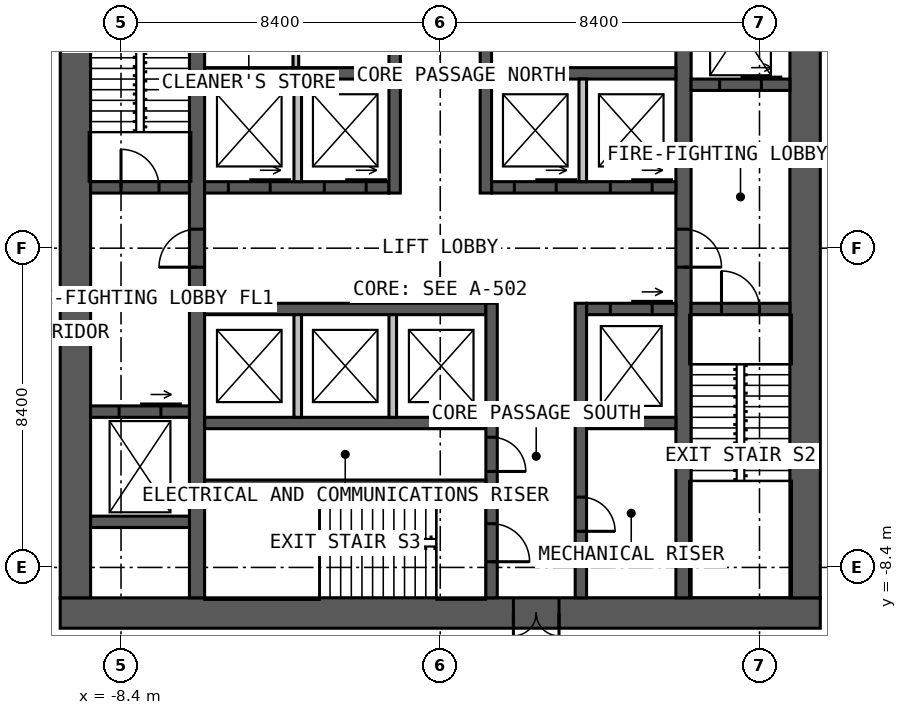
"""IFC4 building model, lengths in metres.
Left out: names, types, materials, properties, quantities, classifications, styles, units other than length and angle.
Written with IfcOpenShell. Run it as: python <this file> out.ifc"""

import sys

from ifc_helpers import new_model, si_unit, direction, frame, frame_2d, origin, place, context, subcontext, project, spatial, rectangle, extrude, element, fill, save


model = new_model("IFC4")
c1 = context("Model", 3, precision=1e-05, world=origin(), true_north=direction((0.0, 1.0)))
c2 = subcontext(c1, "Body", "Model", "MODEL_VIEW")
j1 = project(units=[si_unit("LENGTHUNIT", "METRE"), si_unit("PLANEANGLEUNIT", "RADIAN")], contexts=[c1])
p1 = place(None, origin())
s1 = spatial("IfcSite", under=j1, at=p1, CompositionType="ELEMENT")
p2 = place(p1, origin())
s2 = spatial("IfcBuilding", under=s1, at=p2, CompositionType="ELEMENT")
p3 = place(p2, frame((0.0, 0.0, 61.0)))
s3 = spatial("IfcBuildingStorey", under=s2, at=p3, CompositionType="ELEMENT", Elevation=61.0)
p4 = place(p3, frame((10.0, -9.6, 0.0), z_axis=(0.0, 0.0, 1.0), x_axis=(-1.0, 0.0, 0.0)))
e1 = element("IfcWall", 1, at=p4, inside=s3, PredefinedType="SOLIDWALL", context=c2, shape_type="SweptSolid", body=[
    extrude(rectangle(XDim=20.0, YDim=0.8, at=frame_2d((10.0, 0.0))), origin(), (0.0, 0.0, 1.0), 4.0),
])
p5 = place(p4, frame((6.875, 0.0, 0.0)))
e2 = element("IfcOpeningElement", 2, at=p5, cuts=e1, PredefinedType="OPENING", context=c2, shape_type="SweptSolid", body=[
    extrude(rectangle(XDim=1.2, YDim=2.2, at=frame_2d((0.6, 1.1))), frame((0.0, 0.41, 0.0), z_axis=(0.0, -1.0, 0.0), x_axis=(1.0, 0.0, 0.0)), (0.0, 0.0, 1.0), 0.82),
])
for number, where, z_axis, x_axis in (
    (3, (9.6, -9.2, 0.0), (0.0, 0.0, 1.0), (0.0, 1.0, 0.0)),
    (4, (-9.6, 9.2, 0.0), (0.0, 0.0, 1.0), (0.0, -1.0, 0.0)),
):
    element("IfcWall", number, at=place(p3, frame(where, z_axis=z_axis, x_axis=x_axis)), inside=s3, PredefinedType="SOLIDWALL", context=c2, shape_type="SweptSolid", body=[
        extrude(rectangle(XDim=18.4, YDim=0.8, at=frame_2d((9.2, 0.0))), origin(), (0.0, 0.0, 1.0), 4.0),
    ])
p6 = place(p3, frame((-6.4, -9.2, 0.0), z_axis=(0.0, 0.0, 1.0), x_axis=(0.0, 1.0, 0.0)))
e5 = element("IfcWall", 5, at=p6, inside=s3, PredefinedType="SOLIDWALL", context=c2, shape_type="SweptSolid", body=[
    extrude(rectangle(XDim=18.4, YDim=0.4, at=frame_2d((9.2, 0.0))), origin(), (0.0, 0.0, 1.0), 4.0),
])
p7 = place(p6, frame((8.7, 0.0, 0.0)))
e6 = element("IfcOpeningElement", 6, at=p7, cuts=e5, PredefinedType="OPENING", context=c2, shape_type="SweptSolid", body=[
    extrude(rectangle(XDim=1.0, YDim=2.2, at=frame_2d((0.5, 1.1))), frame((0.0, 0.21, 0.0), z_axis=(0.0, -1.0, 0.0), x_axis=(1.0, 0.0, 0.0)), (0.0, 0.0, 1.0), 0.42),
])
p8 = place(p3, frame((6.4, 9.2, 0.0), z_axis=(0.0, 0.0, 1.0), x_axis=(0.0, -1.0, 0.0)))
e7 = element("IfcWall", 7, at=p8, inside=s3, PredefinedType="SOLIDWALL", context=c2, shape_type="SweptSolid", body=[
    extrude(rectangle(XDim=18.4, YDim=0.4, at=frame_2d((9.2, 0.0))), origin(), (0.0, 0.0, 1.0), 4.0),
])
p9 = place(p8, frame((8.7, 0.0, 0.0)))
e8 = element("IfcOpeningElement", 8, at=p9, cuts=e7, PredefinedType="OPENING", context=c2, shape_type="SweptSolid", body=[
    extrude(rectangle(XDim=1.0, YDim=2.2, at=frame_2d((0.5, 1.1))), frame((0.0, 0.21, 0.0), z_axis=(0.0, -1.0, 0.0), x_axis=(1.0, 0.0, 0.0)), (0.0, 0.0, 1.0), 0.42),
])
p10 = place(p3, frame((-6.2, 1.6, 0.0), z_axis=(0.0, 0.0, 1.0), x_axis=(1.0, 0.0, 0.0)))
e9 = element("IfcWall", 9, at=p10, inside=s3, PredefinedType="SOLIDWALL", context=c2, shape_type="SweptSolid", body=[
    extrude(rectangle(XDim=4.85, YDim=0.3, at=frame_2d((2.425, 0.0))), origin(), (0.0, 0.0, 1.0), 4.0),
])
p11 = place(p10, frame((0.625, 0.0, 0.0)))
e10 = element("IfcOpeningElement", 10, at=p11, cuts=e9, PredefinedType="OPENING", context=c2, shape_type="SweptSolid", body=[
    extrude(rectangle(XDim=1.1, YDim=2.2, at=frame_2d((0.55, 1.1))), frame((0.0, 0.16, 0.0), z_axis=(0.0, -1.0, 0.0), x_axis=(1.0, 0.0, 0.0)), (0.0, 0.0, 1.0), 0.32),
])
p12 = place(p10, frame((3.15, 0.0, 0.0)))
e11 = element("IfcOpeningElement", 11, at=p12, cuts=e9, PredefinedType="OPENING", context=c2, shape_type="SweptSolid", body=[
    extrude(rectangle(XDim=1.1, YDim=2.2, at=frame_2d((0.55, 1.1))), frame((0.0, 0.16, 0.0), z_axis=(0.0, -1.0, 0.0), x_axis=(1.0, 0.0, 0.0)), (0.0, 0.0, 1.0), 0.32),
])
p13 = place(p3, frame((1.35, 1.6, 0.0), z_axis=(0.0, 0.0, 1.0), x_axis=(1.0, 0.0, 0.0)))
e12 = element("IfcWall", 12, at=p13, inside=s3, PredefinedType="SOLIDWALL", context=c2, shape_type="SweptSolid", body=[
    extrude(rectangle(XDim=4.85, YDim=0.3, at=frame_2d((2.425, 0.0))), origin(), (0.0, 0.0, 1.0), 4.0),
])
p14 = place(p13, frame((0.6, 0.0, 0.0)))
e13 = element("IfcOpeningElement", 13, at=p14, cuts=e12, PredefinedType="OPENING", context=c2, shape_type="SweptSolid", body=[
    extrude(rectangle(XDim=1.1, YDim=2.2, at=frame_2d((0.55, 1.1))), frame((0.0, 0.16, 0.0), z_axis=(0.0, -1.0, 0.0), x_axis=(1.0, 0.0, 0.0)), (0.0, 0.0, 1.0), 0.32),
])
p15 = place(p13, frame((3.125, 0.0, 0.0)))
e14 = element("IfcOpeningElement", 14, at=p15, cuts=e12, PredefinedType="OPENING", context=c2, shape_type="SweptSolid", body=[
    extrude(rectangle(XDim=1.1, YDim=2.2, at=frame_2d((0.55, 1.1))), frame((0.0, 0.16, 0.0), z_axis=(0.0, -1.0, 0.0), x_axis=(1.0, 0.0, 0.0)), (0.0, 0.0, 1.0), 0.32),
])
for number, where, z_axis, x_axis in (
    (15, (-6.2, 4.6, 0.0), (0.0, 0.0, 1.0), (1.0, 0.0, 0.0)),
    (16, (1.35, 4.6, 0.0), (0.0, 0.0, 1.0), (1.0, 0.0, 0.0)),
):
    element("IfcWall", number, at=place(p3, frame(where, z_axis=z_axis, x_axis=x_axis)), inside=s3, PredefinedType="SOLIDWALL", context=c2, shape_type="SweptSolid", body=[
        extrude(rectangle(XDim=4.85, YDim=0.3, at=frame_2d((2.425, 0.0))), origin(), (0.0, 0.0, 1.0), 4.0),
    ])
p16 = place(p3, frame((-1.2, 1.45, 0.0), z_axis=(0.0, 0.0, 1.0), x_axis=(0.0, 1.0, 0.0)))
e17 = element("IfcWall", 17, at=p16, inside=s3, PredefinedType="SOLIDWALL", context=c2, shape_type="SweptSolid", body=[
    extrude(rectangle(XDim=7.75, YDim=0.3, at=frame_2d((3.875, 0.0))), origin(), (0.0, 0.0, 1.0), 4.0),
])
p17 = place(p16, frame((5.05, 0.0, 0.0)))
e18 = element("IfcOpeningElement", 18, at=p17, cuts=e17, PredefinedType="OPENING", context=c2, shape_type="SweptSolid", body=[
    extrude(rectangle(XDim=1.0, YDim=2.2, at=frame_2d((0.5, 1.1))), frame((0.0, 0.16, 0.0), z_axis=(0.0, -1.0, 0.0), x_axis=(1.0, 0.0, 0.0)), (0.0, 0.0, 1.0), 0.32),
])
p18 = place(p3, frame((1.2, 1.45, 0.0), z_axis=(0.0, 0.0, 1.0), x_axis=(0.0, 1.0, 0.0)))
e19 = element("IfcWall", 19, at=p18, inside=s3, PredefinedType="SOLIDWALL", context=c2, shape_type="SweptSolid", body=[
    extrude(rectangle(XDim=7.75, YDim=0.3, at=frame_2d((3.875, 0.0))), origin(), (0.0, 0.0, 1.0), 4.0),
])
p19 = place(p18, frame((3.8, 0.0, 0.0)))
e20 = element("IfcOpeningElement", 20, at=p19, cuts=e19, PredefinedType="OPENING", context=c2, shape_type="SweptSolid", body=[
    extrude(rectangle(XDim=1.0, YDim=2.2, at=frame_2d((0.5, 1.1))), frame((0.0, 0.16, 0.0), z_axis=(0.0, -1.0, 0.0), x_axis=(1.0, 0.0, 0.0)), (0.0, 0.0, 1.0), 0.32),
])
p20 = place(p18, frame((6.15, 0.0, 0.0)))
e21 = element("IfcOpeningElement", 21, at=p20, cuts=e19, PredefinedType="OPENING", context=c2, shape_type="SweptSolid", body=[
    extrude(rectangle(XDim=1.0, YDim=2.2, at=frame_2d((0.5, 1.1))), frame((0.0, 0.16, 0.0), z_axis=(0.0, -1.0, 0.0), x_axis=(1.0, 0.0, 0.0)), (0.0, 0.0, 1.0), 0.32),
])
p21 = place(p3, frame((-6.2, -1.6, 0.0), z_axis=(0.0, 0.0, 1.0), x_axis=(1.0, 0.0, 0.0)))
e22 = element("IfcWall", 22, at=p21, inside=s3, PredefinedType="SOLIDWALL", context=c2, shape_type="SweptSolid", body=[
    extrude(rectangle(XDim=7.4, YDim=0.3, at=frame_2d((3.7, 0.0))), origin(), (0.0, 0.0, 1.0), 4.0),
])
p22 = place(p3, frame((3.85, -1.6, 0.0), z_axis=(0.0, 0.0, 1.0), x_axis=(1.0, 0.0, 0.0)))
e23 = element("IfcWall", 23, at=p22, inside=s3, PredefinedType="SOLIDWALL", context=c2, shape_type="SweptSolid", body=[
    extrude(rectangle(XDim=2.35, YDim=0.3, at=frame_2d((1.175, 0.0))), origin(), (0.0, 0.0, 1.0), 4.0),
])
p23 = place(p22, frame((0.625, 0.0, 0.0)))
e24 = element("IfcOpeningElement", 24, at=p23, cuts=e23, PredefinedType="OPENING", context=c2, shape_type="SweptSolid", body=[
    extrude(rectangle(XDim=1.1, YDim=2.2, at=frame_2d((0.55, 1.1))), frame((0.0, 0.16, 0.0), z_axis=(0.0, -1.0, 0.0), x_axis=(1.0, 0.0, 0.0)), (0.0, 0.0, 1.0), 0.32),
])
p24 = place(p3, frame((-6.2, -4.6, 0.0), z_axis=(0.0, 0.0, 1.0), x_axis=(1.0, 0.0, 0.0)))
e25 = element("IfcWall", 25, at=p24, inside=s3, PredefinedType="SOLIDWALL", context=c2, shape_type="SweptSolid", body=[
    extrude(rectangle(XDim=7.4, YDim=0.3, at=frame_2d((3.7, 0.0))), origin(), (0.0, 0.0, 1.0), 4.0),
])
p25 = place(p3, frame((3.85, -4.6, 0.0), z_axis=(0.0, 0.0, 1.0), x_axis=(1.0, 0.0, 0.0)))
e26 = element("IfcWall", 26, at=p25, inside=s3, PredefinedType="SOLIDWALL", context=c2, shape_type="SweptSolid", body=[
    extrude(rectangle(XDim=2.35, YDim=0.3, at=frame_2d((1.175, 0.0))), origin(), (0.0, 0.0, 1.0), 4.0),
])
p26 = place(p3, frame((1.35, -1.45, 0.0), z_axis=(0.0, 0.0, 1.0), x_axis=(0.0, -1.0, 0.0)))
e27 = element("IfcWall", 27, at=p26, inside=s3, PredefinedType="SOLIDWALL", context=c2, shape_type="SweptSolid", body=[
    extrude(rectangle(XDim=7.75, YDim=0.3, at=frame_2d((3.875, 0.0))), origin(), (0.0, 0.0, 1.0), 4.0),
])
p27 = place(p26, frame((5.8, 0.0, 0.0)))
e28 = element("IfcOpeningElement", 28, at=p27, cuts=e27, PredefinedType="OPENING", context=c2, shape_type="SweptSolid", body=[
    extrude(rectangle(XDim=1.0, YDim=2.2, at=frame_2d((0.5, 1.1))), frame((0.0, 0.16, 0.0), z_axis=(0.0, -1.0, 0.0), x_axis=(1.0, 0.0, 0.0)), (0.0, 0.0, 1.0), 0.32),
])
p28 = place(p26, frame((3.525, 0.0, 0.0)))
e29 = element("IfcOpeningElement", 29, at=p28, cuts=e27, PredefinedType="OPENING", context=c2, shape_type="SweptSolid", body=[
    extrude(rectangle(XDim=0.9, YDim=2.2, at=frame_2d((0.45, 1.1))), frame((0.0, 0.16, 0.0), z_axis=(0.0, -1.0, 0.0), x_axis=(1.0, 0.0, 0.0)), (0.0, 0.0, 1.0), 0.32),
])
p29 = place(p3, frame((3.7, -1.45, 0.0), z_axis=(0.0, 0.0, 1.0), x_axis=(0.0, -1.0, 0.0)))
e30 = element("IfcWall", 30, at=p29, inside=s3, PredefinedType="SOLIDWALL", context=c2, shape_type="SweptSolid", body=[
    extrude(rectangle(XDim=7.75, YDim=0.3, at=frame_2d((3.875, 0.0))), origin(), (0.0, 0.0, 1.0), 4.0),
])
p30 = place(p29, frame((5.1, 0.0, 0.0)))
e31 = element("IfcOpeningElement", 31, at=p30, cuts=e30, PredefinedType="OPENING", context=c2, shape_type="SweptSolid", body=[
    extrude(rectangle(XDim=0.9, YDim=2.2, at=frame_2d((0.45, 1.1))), frame((0.0, 0.16, 0.0), z_axis=(0.0, -1.0, 0.0), x_axis=(1.0, 0.0, 0.0)), (0.0, 0.0, 1.0), 0.32),
])
p31 = place(p3, frame((-6.2, -6.2, 0.0), z_axis=(0.0, 0.0, 1.0), x_axis=(1.0, 0.0, 0.0)))
e32 = element("IfcWall", 32, at=p31, inside=s3, PredefinedType="SOLIDWALL", context=c2, shape_type="SweptSolid", body=[
    extrude(rectangle(XDim=7.4, YDim=0.2, at=frame_2d((3.7, 0.0))), origin(), (0.0, 0.0, 1.0), 4.0),
])
p32 = place(p3, frame((-9.2, 1.6, 0.0), z_axis=(0.0, 0.0, 1.0), x_axis=(1.0, 0.0, 0.0)))
e33 = element("IfcWall", 33, at=p32, inside=s3, PredefinedType="SOLIDWALL", context=c2, shape_type="SweptSolid", body=[
    extrude(rectangle(XDim=2.6, YDim=0.3, at=frame_2d((1.3, 0.0))), origin(), (0.0, 0.0, 1.0), 4.0),
])
p33 = place(p32, frame((0.8, 0.0, 0.0)))
e34 = element("IfcOpeningElement", 34, at=p33, cuts=e33, PredefinedType="OPENING", context=c2, shape_type="SweptSolid", body=[
    extrude(rectangle(XDim=1.0, YDim=2.2, at=frame_2d((0.5, 1.1))), frame((0.0, 0.16, 0.0), z_axis=(0.0, -1.0, 0.0), x_axis=(1.0, 0.0, 0.0)), (0.0, 0.0, 1.0), 0.32),
])
p34 = place(p3, frame((6.6, -1.6, 0.0), z_axis=(0.0, 0.0, 1.0), x_axis=(1.0, 0.0, 0.0)))
e35 = element("IfcWall", 35, at=p34, inside=s3, PredefinedType="SOLIDWALL", context=c2, shape_type="SweptSolid", body=[
    extrude(rectangle(XDim=2.6, YDim=0.3, at=frame_2d((1.3, 0.0))), origin(), (0.0, 0.0, 1.0), 4.0),
])
p35 = place(p34, frame((0.8, 0.0, 0.0)))
e36 = element("IfcOpeningElement", 36, at=p35, cuts=e35, PredefinedType="OPENING", context=c2, shape_type="SweptSolid", body=[
    extrude(rectangle(XDim=1.0, YDim=2.2, at=frame_2d((0.5, 1.1))), frame((0.0, 0.16, 0.0), z_axis=(0.0, -1.0, 0.0), x_axis=(1.0, 0.0, 0.0)), (0.0, 0.0, 1.0), 0.32),
])
p36 = place(p3, frame((-9.2, -4.3, 0.0), z_axis=(0.0, 0.0, 1.0), x_axis=(1.0, 0.0, 0.0)))
e37 = element("IfcWall", 37, at=p36, inside=s3, PredefinedType="SOLIDWALL", context=c2, shape_type="SweptSolid", body=[
    extrude(rectangle(XDim=2.6, YDim=0.3, at=frame_2d((1.3, 0.0))), origin(), (0.0, 0.0, 1.0), 4.0),
])
p37 = place(p36, frame((0.75, 0.0, 0.0)))
e38 = element("IfcOpeningElement", 38, at=p37, cuts=e37, PredefinedType="OPENING", context=c2, shape_type="SweptSolid", body=[
    extrude(rectangle(XDim=1.1, YDim=2.2, at=frame_2d((0.55, 1.1))), frame((0.0, 0.16, 0.0), z_axis=(0.0, -1.0, 0.0), x_axis=(1.0, 0.0, 0.0)), (0.0, 0.0, 1.0), 0.32),
])
p38 = place(p3, frame((6.6, 4.3, 0.0), z_axis=(0.0, 0.0, 1.0), x_axis=(1.0, 0.0, 0.0)))
e39 = element("IfcWall", 39, at=p38, inside=s3, PredefinedType="SOLIDWALL", context=c2, shape_type="SweptSolid", body=[
    extrude(rectangle(XDim=2.6, YDim=0.3, at=frame_2d((1.3, 0.0))), origin(), (0.0, 0.0, 1.0), 4.0),
])
p39 = place(p38, frame((0.75, 0.0, 0.0)))
e40 = element("IfcOpeningElement", 40, at=p39, cuts=e39, PredefinedType="OPENING", context=c2, shape_type="SweptSolid", body=[
    extrude(rectangle(XDim=1.1, YDim=2.2, at=frame_2d((0.55, 1.1))), frame((0.0, 0.16, 0.0), z_axis=(0.0, -1.0, 0.0), x_axis=(1.0, 0.0, 0.0)), (0.0, 0.0, 1.0), 0.32),
])
p40 = place(p3, frame((-9.2, -7.2, 0.0), z_axis=(0.0, 0.0, 1.0), x_axis=(1.0, 0.0, 0.0)))
e41 = element("IfcWall", 41, at=p40, inside=s3, PredefinedType="SOLIDWALL", context=c2, shape_type="SweptSolid", body=[
    extrude(rectangle(XDim=2.6, YDim=0.3, at=frame_2d((1.3, 0.0))), origin(), (0.0, 0.0, 1.0), 4.0),
])
for number, where, z_axis, x_axis in (
    (42, (-3.75, 1.75, 0.0), (0.0, 0.0, 1.0), (0.0, 1.0, 0.0)),
    (43, (3.75, 1.75, 0.0), (0.0, 0.0, 1.0), (0.0, 1.0, 0.0)),
    (44, (-3.75, -1.75, 0.0), (0.0, 0.0, 1.0), (0.0, -1.0, 0.0)),
    (45, (-1.25, -1.75, 0.0), (0.0, 0.0, 1.0), (0.0, -1.0, 0.0)),
):
    element("IfcWall", number, at=place(p3, frame(where, z_axis=z_axis, x_axis=x_axis)), inside=s3, PredefinedType="SOLIDWALL", context=c2, shape_type="SweptSolid", body=[
        extrude(rectangle(XDim=2.7, YDim=0.2, at=frame_2d((1.35, 0.0))), origin(), (0.0, 0.0, 1.0), 3.75),
    ])
p41 = place(p3, frame((-3.8, 4.75, 0.0), z_axis=(0.0, 0.0, 1.0), x_axis=(0.0, 1.0, 0.0)))
e46 = element("IfcWall", 46, at=p41, inside=s3, PredefinedType="PARTITIONING", context=c2, shape_type="SweptSolid", body=[
    extrude(rectangle(XDim=1.375, YDim=0.15, at=frame_2d((0.688, 0.0))), origin(), (0.0, 0.0, 1.0), 3.75),
])
p42 = place(p5, origin())
e47 = element("IfcDoor", 47, at=p42, inside=s3, OperationType="DOUBLE_DOOR_SINGLE_SWING", PredefinedType="DOOR", context=c2, shape_type="SweptSolid", body=[
    extrude(rectangle(XDim=1.2, YDim=2.2, at=frame_2d((0.6, 1.1))), frame((0.0, 0.025, 0.0), z_axis=(0.0, -1.0, 0.0), x_axis=(1.0, 0.0, 0.0)), (0.0, 0.0, 1.0), 0.05),
])
fill(e2, e47)
p43 = place(p7, origin())
e48 = element("IfcDoor", 48, at=p43, inside=s3, OperationType="SINGLE_SWING_LEFT", PredefinedType="DOOR", context=c2, shape_type="SweptSolid", body=[
    extrude(rectangle(XDim=1.0, YDim=2.2, at=frame_2d((0.5, 1.1))), frame((0.0, 0.025, 0.0), z_axis=(0.0, -1.0, 0.0), x_axis=(1.0, 0.0, 0.0)), (0.0, 0.0, 1.0), 0.05),
])
fill(e6, e48)
p44 = place(p9, origin())
e49 = element("IfcDoor", 49, at=p44, inside=s3, OperationType="SINGLE_SWING_RIGHT", PredefinedType="DOOR", context=c2, shape_type="SweptSolid", body=[
    extrude(rectangle(XDim=1.0, YDim=2.2, at=frame_2d((0.5, 1.1))), frame((0.0, 0.025, 0.0), z_axis=(0.0, -1.0, 0.0), x_axis=(1.0, 0.0, 0.0)), (0.0, 0.0, 1.0), 0.05),
])
fill(e8, e49)
p45 = place(p33, origin())
e50 = element("IfcDoor", 50, at=p45, inside=s3, OperationType="SINGLE_SWING_LEFT", PredefinedType="DOOR", context=c2, shape_type="SweptSolid", body=[
    extrude(rectangle(XDim=1.0, YDim=2.2, at=frame_2d((0.5, 1.1))), frame((0.0, 0.025, 0.0), z_axis=(0.0, -1.0, 0.0), x_axis=(1.0, 0.0, 0.0)), (0.0, 0.0, 1.0), 0.05),
])
fill(e34, e50)
p46 = place(p35, origin())
e51 = element("IfcDoor", 51, at=p46, inside=s3, OperationType="SINGLE_SWING_LEFT", PredefinedType="DOOR", context=c2, shape_type="SweptSolid", body=[
    extrude(rectangle(XDim=1.0, YDim=2.2, at=frame_2d((0.5, 1.1))), frame((0.0, 0.025, 0.0), z_axis=(0.0, -1.0, 0.0), x_axis=(1.0, 0.0, 0.0)), (0.0, 0.0, 1.0), 0.05),
])
fill(e36, e51)
p47 = place(p27, origin())
e52 = element("IfcDoor", 52, at=p47, inside=s3, OperationType="SINGLE_SWING_RIGHT", PredefinedType="DOOR", context=c2, shape_type="SweptSolid", body=[
    extrude(rectangle(XDim=1.0, YDim=2.2, at=frame_2d((0.5, 1.1))), frame((0.0, 0.025, 0.0), z_axis=(0.0, -1.0, 0.0), x_axis=(1.0, 0.0, 0.0)), (0.0, 0.0, 1.0), 0.05),
])
fill(e28, e52)
p48 = place(p28, origin())
e53 = element("IfcDoor", 53, at=p48, inside=s3, OperationType="SINGLE_SWING_RIGHT", PredefinedType="DOOR", context=c2, shape_type="SweptSolid", body=[
    extrude(rectangle(XDim=0.9, YDim=2.2, at=frame_2d((0.45, 1.1))), frame((0.0, 0.025, 0.0), z_axis=(0.0, -1.0, 0.0), x_axis=(1.0, 0.0, 0.0)), (0.0, 0.0, 1.0), 0.05),
])
fill(e29, e53)
p49 = place(p30, origin())
e54 = element("IfcDoor", 54, at=p49, inside=s3, OperationType="SINGLE_SWING_RIGHT", PredefinedType="DOOR", context=c2, shape_type="SweptSolid", body=[
    extrude(rectangle(XDim=0.9, YDim=2.2, at=frame_2d((0.45, 1.1))), frame((0.0, 0.025, 0.0), z_axis=(0.0, -1.0, 0.0), x_axis=(1.0, 0.0, 0.0)), (0.0, 0.0, 1.0), 0.05),
])
fill(e31, e54)
p50 = place(p11, origin())
e55 = element("IfcDoor", 55, at=p50, inside=s3, OperationType="SLIDING_TO_LEFT", PredefinedType="DOOR", context=c2, shape_type="SweptSolid", body=[
    extrude(rectangle(XDim=1.1, YDim=2.2, at=frame_2d((0.55, 1.1))), frame((0.0, 0.025, 0.0), z_axis=(0.0, -1.0, 0.0), x_axis=(1.0, 0.0, 0.0)), (0.0, 0.0, 1.0), 0.05),
])
fill(e10, e55)
p51 = place(p12, origin())
e56 = element("IfcDoor", 56, at=p51, inside=s3, OperationType="SLIDING_TO_LEFT", PredefinedType="DOOR", context=c2, shape_type="SweptSolid", body=[
    extrude(rectangle(XDim=1.1, YDim=2.2, at=frame_2d((0.55, 1.1))), frame((0.0, 0.025, 0.0), z_axis=(0.0, -1.0, 0.0), x_axis=(1.0, 0.0, 0.0)), (0.0, 0.0, 1.0), 0.05),
])
fill(e11, e56)
p52 = place(p14, origin())
e57 = element("IfcDoor", 57, at=p52, inside=s3, OperationType="SLIDING_TO_LEFT", PredefinedType="DOOR", context=c2, shape_type="SweptSolid", body=[
    extrude(rectangle(XDim=1.1, YDim=2.2, at=frame_2d((0.55, 1.1))), frame((0.0, 0.025, 0.0), z_axis=(0.0, -1.0, 0.0), x_axis=(1.0, 0.0, 0.0)), (0.0, 0.0, 1.0), 0.05),
])
fill(e13, e57)
p53 = place(p15, origin())
e58 = element("IfcDoor", 58, at=p53, inside=s3, OperationType="SLIDING_TO_LEFT", PredefinedType="DOOR", context=c2, shape_type="SweptSolid", body=[
    extrude(rectangle(XDim=1.1, YDim=2.2, at=frame_2d((0.55, 1.1))), frame((0.0, 0.025, 0.0), z_axis=(0.0, -1.0, 0.0), x_axis=(1.0, 0.0, 0.0)), (0.0, 0.0, 1.0), 0.05),
])
fill(e14, e58)
p54 = place(p23, origin())
e59 = element("IfcDoor", 59, at=p54, inside=s3, OperationType="SLIDING_TO_LEFT", PredefinedType="DOOR", context=c2, shape_type="SweptSolid", body=[
    extrude(rectangle(XDim=1.1, YDim=2.2, at=frame_2d((0.55, 1.1))), frame((0.0, 0.025, 0.0), z_axis=(0.0, -1.0, 0.0), x_axis=(1.0, 0.0, 0.0)), (0.0, 0.0, 1.0), 0.05),
])
fill(e24, e59)
p55 = place(p37, origin())
e60 = element("IfcDoor", 60, at=p55, inside=s3, OperationType="SLIDING_TO_LEFT", PredefinedType="DOOR", context=c2, shape_type="SweptSolid", body=[
    extrude(rectangle(XDim=1.1, YDim=2.2, at=frame_2d((0.55, 1.1))), frame((0.0, 0.025, 0.0), z_axis=(0.0, -1.0, 0.0), x_axis=(1.0, 0.0, 0.0)), (0.0, 0.0, 1.0), 0.05),
])
fill(e38, e60)
p56 = place(p39, origin())
e61 = element("IfcDoor", 61, at=p56, inside=s3, OperationType="SLIDING_TO_LEFT", PredefinedType="DOOR", context=c2, shape_type="SweptSolid", body=[
    extrude(rectangle(XDim=1.1, YDim=2.2, at=frame_2d((0.55, 1.1))), frame((0.0, 0.025, 0.0), z_axis=(0.0, -1.0, 0.0), x_axis=(1.0, 0.0, 0.0)), (0.0, 0.0, 1.0), 0.05),
])
fill(e40, e61)
save(model, sys.argv[1])
